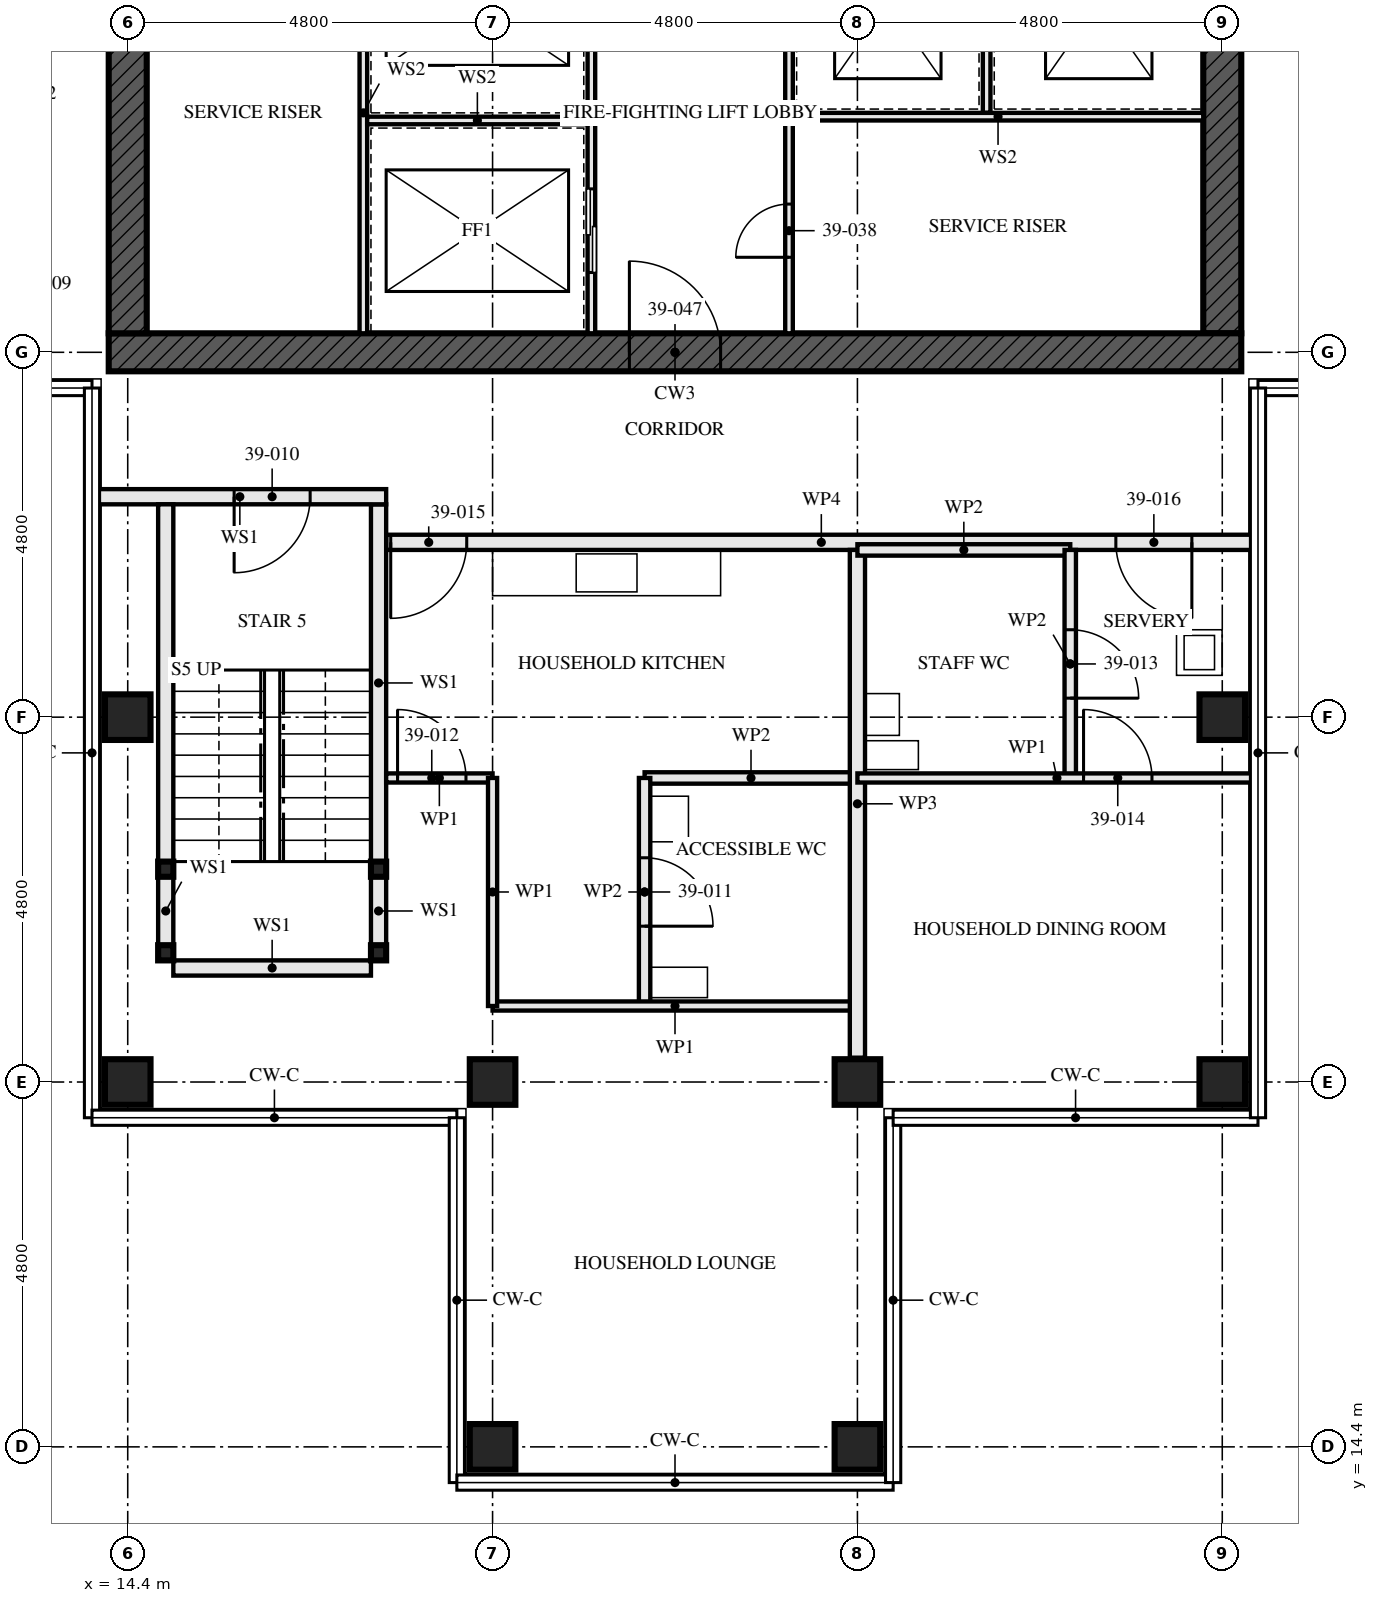
"""IFC4 building model, lengths in metres.
Left out: names, types, materials, properties, quantities, classifications, styles, units other than length and angle.
Written with IfcOpenShell. Run it as: python <this file> out.ifc"""

import sys

from ifc_helpers import new_model, si_unit, direction, frame, frame_2d, origin, origin_2d, place, context, subcontext, project, spatial, rectangle, hollow_rectangle, extrude, element, fill, save


model = new_model("IFC4")
c1 = context("Model", 3, precision=1e-05, world=origin(), true_north=direction((0.0, 1.0)))
c2 = subcontext(c1, "Body", "Model", "MODEL_VIEW")
j1 = project(units=[si_unit("LENGTHUNIT", "METRE"), si_unit("PLANEANGLEUNIT", "RADIAN")], contexts=[c1])
p1 = place(None, origin())
s1 = spatial("IfcSite", under=j1, at=p1, CompositionType="ELEMENT")
p2 = place(p1, origin())
s2 = spatial("IfcBuilding", under=s1, at=p2, CompositionType="ELEMENT")
p3 = place(p2, frame((0.0, 0.0, 144.5)))
s3 = spatial("IfcBuildingStorey", under=s2, at=p3, CompositionType="ELEMENT", Elevation=144.5)
for number, where, z_axis, x_axis in (
    (1, (14.4, 19.2, 0.0), (0.0, 0.0, 1.0), (0.0, 1.0, 0.0)),
    (2, (14.4, 24.0, 0.0), (0.0, 0.0, 1.0), (1.0, 0.0, 0.0)),
    (3, (19.2, 14.4, 0.0), (0.0, 0.0, 1.0), (0.0, 1.0, 0.0)),
    (4, (19.2, 19.2, 0.0), (0.0, 0.0, 1.0), (0.0, 1.0, 0.0)),
    (5, (24.0, 14.4, 0.0), (0.0, 0.0, 1.0), (0.0, 1.0, 0.0)),
    (6, (24.0, 19.2, 0.0), (0.0, 0.0, 1.0), (0.0, 1.0, 0.0)),
    (7, (28.8, 19.2, 0.0), (0.0, 0.0, 1.0), (0.0, 1.0, 0.0)),
    (8, (28.8, 24.0, 0.0), (0.0, 0.0, 1.0), (1.0, 0.0, 0.0)),
):
    element("IfcColumn", number, at=place(p3, frame(where, z_axis=z_axis, x_axis=x_axis)), inside=s3, PredefinedType="COLUMN", context=c2, shape_type="SweptSolid", body=[
        extrude(hollow_rectangle(XDim=0.6, YDim=0.6, WallThickness=0.08, at=origin_2d()), origin(), (0.0, 0.0, 1.0), 3.5),
    ])
p4 = place(p3, frame((14.15, 28.8, -0.17), z_axis=(0.0, 0.0, 1.0), x_axis=(1.0, 0.0, 0.0)))
e9 = element("IfcWall", 9, at=p4, inside=s3, PredefinedType="SHEAR", context=c2, shape_type="SweptSolid", body=[
    extrude(rectangle(XDim=14.9, YDim=0.5, at=frame_2d((7.45, 0.0))), origin(), (0.0, 0.0, 1.0), 3.5),
])
p5 = place(p4, frame((6.85, 0.0, 0.17)))
e10 = element("IfcOpeningElement", 10, at=p5, cuts=e9, PredefinedType="OPENING", context=c2, shape_type="SweptSolid", body=[
    extrude(rectangle(XDim=1.2, YDim=2.1, at=frame_2d((0.6, 1.05))), frame((0.0, 0.26, 0.0), z_axis=(0.0, -1.0, 0.0), x_axis=(1.0, 0.0, 0.0)), (0.0, 0.0, 1.0), 0.521),
])
p6 = place(p3, frame((14.4, 42.95, -0.17), z_axis=(0.0, 0.0, 1.0), x_axis=(0.0, -1.0, 0.0)))
e11 = element("IfcWall", 11, at=p6, inside=s3, PredefinedType="SHEAR", context=c2, shape_type="SweptSolid", body=[
    extrude(rectangle(XDim=13.9, YDim=0.5, at=frame_2d((6.95, 0.0))), origin(), (0.0, 0.0, 1.0), 3.5),
])
p7 = place(p6, frame((6.35, 0.0, 0.17)))
e12 = element("IfcOpeningElement", 12, at=p7, cuts=e11, PredefinedType="OPENING", context=c2, shape_type="SweptSolid", body=[
    extrude(rectangle(XDim=1.2, YDim=2.1, at=frame_2d((0.6, 1.05))), frame((0.0, 0.26, 0.0), z_axis=(0.0, -1.0, 0.0), x_axis=(1.0, 0.0, 0.0)), (0.0, 0.0, 1.0), 0.521),
])
p8 = place(p3, frame((28.8, 29.05, -0.17), z_axis=(0.0, 0.0, 1.0), x_axis=(0.0, 1.0, 0.0)))
e13 = element("IfcWall", 13, at=p8, inside=s3, PredefinedType="SHEAR", context=c2, shape_type="SweptSolid", body=[
    extrude(rectangle(XDim=13.9, YDim=0.5, at=frame_2d((6.95, 0.0))), origin(), (0.0, 0.0, 1.0), 3.5),
])
p9 = place(p8, frame((6.35, 0.0, 0.17)))
e14 = element("IfcOpeningElement", 14, at=p9, cuts=e13, PredefinedType="OPENING", context=c2, shape_type="SweptSolid", body=[
    extrude(rectangle(XDim=1.2, YDim=2.1, at=frame_2d((0.6, 1.05))), frame((0.0, 0.26, 0.0), z_axis=(0.0, -1.0, 0.0), x_axis=(1.0, 0.0, 0.0)), (0.0, 0.0, 1.0), 0.521),
])
for number, where, z_axis, x_axis in (
    (15, (14.9, 20.9, 0.0), (0.0, 0.0, 1.0), (1.0, 0.0, 0.0)),
    (16, (17.7, 20.9, 0.0), (0.0, 0.0, 1.0), (1.0, 0.0, 0.0)),
    (17, (14.9, 22.0, 0.0), (0.0, 0.0, 1.0), (1.0, 0.0, 0.0)),
    (18, (17.7, 22.0, 0.0), (0.0, 0.0, 1.0), (1.0, 0.0, 0.0)),
):
    element("IfcColumn", number, at=place(p3, frame(where, z_axis=z_axis, x_axis=x_axis)), inside=s3, PredefinedType="COLUMN", context=c2, shape_type="SweptSolid", body=[
        extrude(hollow_rectangle(XDim=0.2, YDim=0.2, WallThickness=0.008, at=origin_2d()), origin(), (0.0, 0.0, 1.0), 3.33),
    ])
p10 = place(p3, frame((14.9, 21.0, 0.0), z_axis=(0.0, 0.0, 1.0), x_axis=(0.0, 1.0, 0.0)))
e19 = element("IfcWall", 19, at=p10, inside=s3, PredefinedType="SOLIDWALL", context=c2, shape_type="SweptSolid", body=[
    extrude(rectangle(XDim=0.9, YDim=0.2, at=frame_2d((0.45, 0.0))), origin(), (0.0, 0.0, 1.0), 2.99),
])
p11 = place(p3, frame((14.9, 22.1, 0.0), z_axis=(0.0, 0.0, 1.0), x_axis=(0.0, 1.0, 0.0)))
e20 = element("IfcWall", 20, at=p11, inside=s3, PredefinedType="SOLIDWALL", context=c2, shape_type="SweptSolid", body=[
    extrude(rectangle(XDim=4.7, YDim=0.2, at=frame_2d((2.35, 0.0))), origin(), (0.0, 0.0, 1.0), 2.99),
])
p12 = place(p3, frame((17.7, 21.0, 0.0), z_axis=(0.0, 0.0, 1.0), x_axis=(0.0, 1.0, 0.0)))
e21 = element("IfcWall", 21, at=p12, inside=s3, PredefinedType="SOLIDWALL", context=c2, shape_type="SweptSolid", body=[
    extrude(rectangle(XDim=0.9, YDim=0.2, at=frame_2d((0.45, 0.0))), origin(), (0.0, 0.0, 1.0), 2.99),
])
p13 = place(p3, frame((17.7, 22.1, 0.0), z_axis=(0.0, 0.0, 1.0), x_axis=(0.0, 1.0, 0.0)))
e22 = element("IfcWall", 22, at=p13, inside=s3, PredefinedType="SOLIDWALL", context=c2, shape_type="SweptSolid", body=[
    extrude(rectangle(XDim=4.7, YDim=0.2, at=frame_2d((2.35, 0.0))), origin(), (0.0, 0.0, 1.0), 2.99),
])
p14 = place(p3, frame((15.0, 20.7, 0.0), z_axis=(0.0, 0.0, 1.0), x_axis=(1.0, 0.0, 0.0)))
e23 = element("IfcWall", 23, at=p14, inside=s3, PredefinedType="SOLIDWALL", context=c2, shape_type="SweptSolid", body=[
    extrude(rectangle(XDim=2.6, YDim=0.2, at=frame_2d((1.3, 0.0))), origin(), (0.0, 0.0, 1.0), 3.33),
])
p15 = place(p3, frame((13.95, 26.9, 0.0), z_axis=(0.0, 0.0, 1.0), x_axis=(1.0, 0.0, 0.0)))
e24 = element("IfcWall", 24, at=p15, inside=s3, PredefinedType="SOLIDWALL", context=c2, shape_type="SweptSolid", body=[
    extrude(rectangle(XDim=3.85, YDim=0.2, at=frame_2d((1.925, 0.0))), origin(), (0.0, 0.0, 1.0), 2.32),
])
p16 = place(p15, frame((1.85, 0.0, 0.0)))
e25 = element("IfcOpeningElement", 25, at=p16, cuts=e24, PredefinedType="OPENING", context=c2, shape_type="SweptSolid", body=[
    extrude(rectangle(XDim=1.0, YDim=2.1, at=frame_2d((0.5, 1.05))), frame((0.0, 0.111, 0.0), z_axis=(0.0, -1.0, 0.0), x_axis=(1.0, 0.0, 0.0)), (0.0, 0.0, 1.0), 0.221),
])
p17 = place(p3, frame((21.2, 20.2, 0.0), z_axis=(0.0, 0.0, 1.0), x_axis=(0.0, 1.0, 0.0)))
e26 = element("IfcWall", 26, at=p17, inside=s3, PredefinedType="PARTITIONING", context=c2, shape_type="SweptSolid", body=[
    extrude(rectangle(XDim=3.0, YDim=0.15, at=frame_2d((1.5, 0.0))), origin(), (0.0, 0.0, 1.0), 3.33),
])
p18 = place(p17, frame((1.05, 0.0, 0.0)))
e27 = element("IfcOpeningElement", 27, at=p18, cuts=e26, PredefinedType="OPENING", context=c2, shape_type="SweptSolid", body=[
    extrude(rectangle(XDim=0.9, YDim=2.1, at=frame_2d((0.45, 1.05))), frame((0.0, 0.085, 0.0), z_axis=(0.0, -1.0, 0.0), x_axis=(1.0, 0.0, 0.0)), (0.0, 0.0, 1.0), 0.171),
])
p19 = place(p3, frame((21.2, 23.2, 0.0), z_axis=(0.0, 0.0, 1.0), x_axis=(1.0, 0.0, 0.0)))
e28 = element("IfcWall", 28, at=p19, inside=s3, PredefinedType="PARTITIONING", context=c2, shape_type="SweptSolid", body=[
    extrude(rectangle(XDim=2.8, YDim=0.15, at=frame_2d((1.4, 0.0))), origin(), (0.0, 0.0, 1.0), 3.33),
])
p20 = place(p3, frame((17.8, 23.2, 0.0), z_axis=(0.0, 0.0, 1.0), x_axis=(1.0, 0.0, 0.0)))
e29 = element("IfcWall", 29, at=p20, inside=s3, PredefinedType="PARTITIONING", context=c2, shape_type="SweptSolid", body=[
    extrude(rectangle(XDim=1.4, YDim=0.12, at=frame_2d((0.7, 0.0))), origin(), (0.0, 0.0, 1.0), 3.33),
])
p21 = place(p20, frame((0.15, 0.0, 0.0)))
e30 = element("IfcOpeningElement", 30, at=p21, cuts=e29, PredefinedType="OPENING", context=c2, shape_type="SweptSolid", body=[
    extrude(rectangle(XDim=0.9, YDim=2.1, at=frame_2d((0.45, 1.05))), frame((0.0, 0.071, 0.0), z_axis=(0.0, -1.0, 0.0), x_axis=(1.0, 0.0, 0.0)), (0.0, 0.0, 1.0), 0.141),
])
p22 = place(p3, frame((19.2, 20.2, 0.0), z_axis=(0.0, 0.0, 1.0), x_axis=(1.0, 0.0, 0.0)))
e31 = element("IfcWall", 31, at=p22, inside=s3, PredefinedType="PARTITIONING", context=c2, shape_type="SweptSolid", body=[
    extrude(rectangle(XDim=4.8, YDim=0.12, at=frame_2d((2.4, 0.0))), origin(), (0.0, 0.0, 1.0), 3.33),
])
p23 = place(p3, frame((19.2, 20.2, 0.0), z_axis=(0.0, 0.0, 1.0), x_axis=(0.0, 1.0, 0.0)))
e32 = element("IfcWall", 32, at=p23, inside=s3, PredefinedType="PARTITIONING", context=c2, shape_type="SweptSolid", body=[
    extrude(rectangle(XDim=3.0, YDim=0.12, at=frame_2d((1.5, 0.0))), origin(), (0.0, 0.0, 1.0), 2.55),
])
p24 = place(p3, frame((24.0, 19.52, 0.0), z_axis=(0.0, 0.0, 1.0), x_axis=(0.0, 1.0, 0.0)))
e33 = element("IfcWall", 33, at=p24, inside=s3, PredefinedType="PARTITIONING", context=c2, shape_type="SweptSolid", body=[
    extrude(rectangle(XDim=6.68, YDim=0.2, at=frame_2d((3.34, 0.0))), origin(), (0.0, 0.0, 1.0), 2.55),
])
p25 = place(p3, frame((26.8, 23.2, 0.0), z_axis=(0.0, 0.0, 1.0), x_axis=(0.0, 1.0, 0.0)))
e34 = element("IfcWall", 34, at=p25, inside=s3, PredefinedType="PARTITIONING", context=c2, shape_type="SweptSolid", body=[
    extrude(rectangle(XDim=3.0, YDim=0.15, at=frame_2d((1.5, 0.0))), origin(), (0.0, 0.0, 1.0), 2.55),
])
p26 = place(p25, frame((1.05, 0.0, 0.0)))
e35 = element("IfcOpeningElement", 35, at=p26, cuts=e34, PredefinedType="OPENING", context=c2, shape_type="SweptSolid", body=[
    extrude(rectangle(XDim=0.9, YDim=2.1, at=frame_2d((0.45, 1.05))), frame((0.0, 0.085, 0.0), z_axis=(0.0, -1.0, 0.0), x_axis=(1.0, 0.0, 0.0)), (0.0, 0.0, 1.0), 0.171),
])
p27 = place(p3, frame((24.0, 26.2, 0.0), z_axis=(0.0, 0.0, 1.0), x_axis=(1.0, 0.0, 0.0)))
e36 = element("IfcWall", 36, at=p27, inside=s3, PredefinedType="PARTITIONING", context=c2, shape_type="SweptSolid", body=[
    extrude(rectangle(XDim=2.8, YDim=0.15, at=frame_2d((1.4, 0.0))), origin(), (0.0, 0.0, 1.0), 3.33),
])
p28 = place(p3, frame((24.0, 23.2, 0.0), z_axis=(0.0, 0.0, 1.0), x_axis=(1.0, 0.0, 0.0)))
e37 = element("IfcWall", 37, at=p28, inside=s3, PredefinedType="PARTITIONING", context=c2, shape_type="SweptSolid", body=[
    extrude(rectangle(XDim=5.25, YDim=0.12, at=frame_2d((2.625, 0.0))), origin(), (0.0, 0.0, 1.0), 2.32),
])
p29 = place(p28, frame((2.975, 0.0, 0.0)))
e38 = element("IfcOpeningElement", 38, at=p29, cuts=e37, PredefinedType="OPENING", context=c2, shape_type="SweptSolid", body=[
    extrude(rectangle(XDim=0.9, YDim=2.1, at=frame_2d((0.45, 1.05))), frame((0.0, 0.071, 0.0), z_axis=(0.0, -1.0, 0.0), x_axis=(1.0, 0.0, 0.0)), (0.0, 0.0, 1.0), 0.141),
])
p30 = place(p3, frame((17.8, 26.3, 0.0), z_axis=(0.0, 0.0, 1.0), x_axis=(1.0, 0.0, 0.0)))
e39 = element("IfcWall", 39, at=p30, inside=s3, PredefinedType="PARTITIONING", context=c2, shape_type="SweptSolid", body=[
    extrude(rectangle(XDim=11.45, YDim=0.2, at=frame_2d((5.725, 0.0))), origin(), (0.0, 0.0, 1.0), 2.32),
])
p31 = place(p30, frame((0.06, 0.0, 0.0)))
e40 = element("IfcOpeningElement", 40, at=p31, cuts=e39, PredefinedType="OPENING", context=c2, shape_type="SweptSolid", body=[
    extrude(rectangle(XDim=1.0, YDim=2.1, at=frame_2d((0.5, 1.05))), frame((0.0, 0.111, 0.0), z_axis=(0.0, -1.0, 0.0), x_axis=(1.0, 0.0, 0.0)), (0.0, 0.0, 1.0), 0.221),
])
p32 = place(p30, frame((9.6, 0.0, 0.0)))
e41 = element("IfcOpeningElement", 41, at=p32, cuts=e39, PredefinedType="OPENING", context=c2, shape_type="SweptSolid", body=[
    extrude(rectangle(XDim=1.0, YDim=2.1, at=frame_2d((0.5, 1.05))), frame((0.0, 0.111, 0.0), z_axis=(0.0, -1.0, 0.0), x_axis=(1.0, 0.0, 0.0)), (0.0, 0.0, 1.0), 0.221),
])
p33 = place(p3, frame((20.5, 29.05, 0.0), z_axis=(0.0, 0.0, 1.0), x_axis=(0.0, 1.0, 0.0)))
e42 = element("IfcWall", 42, at=p33, inside=s3, PredefinedType="SOLIDWALL", context=c2, shape_type="SweptSolid", body=[
    extrude(rectangle(XDim=5.8, YDim=0.1, at=frame_2d((2.9, 0.0))), origin(), (0.0, 0.0, 1.0), 3.33),
])
p34 = place(p33, frame((0.8, 0.0, 0.0)))
e43 = element("IfcOpeningElement", 43, at=p34, cuts=e42, PredefinedType="OPENING", context=c2, shape_type="SweptSolid", body=[
    extrude(rectangle(XDim=1.1, YDim=2.3, at=frame_2d((0.55, 1.15))), frame((0.0, 0.061, 0.0), z_axis=(0.0, -1.0, 0.0), x_axis=(1.0, 0.0, 0.0)), (0.0, 0.0, 1.0), 0.121),
])
p35 = place(p33, frame((3.775, 0.0, 0.0)))
e44 = element("IfcOpeningElement", 44, at=p35, cuts=e42, PredefinedType="OPENING", context=c2, shape_type="SweptSolid", body=[
    extrude(rectangle(XDim=1.1, YDim=2.3, at=frame_2d((0.55, 1.15))), frame((0.0, 0.061, 0.0), z_axis=(0.0, -1.0, 0.0), x_axis=(1.0, 0.0, 0.0)), (0.0, 0.0, 1.0), 0.121),
])
p36 = place(p3, frame((23.1, 29.05, 0.0), z_axis=(0.0, 0.0, 1.0), x_axis=(0.0, 1.0, 0.0)))
e45 = element("IfcWall", 45, at=p36, inside=s3, PredefinedType="SOLIDWALL", context=c2, shape_type="SweptSolid", body=[
    extrude(rectangle(XDim=5.8, YDim=0.1, at=frame_2d((2.9, 0.0))), origin(), (0.0, 0.0, 1.0), 3.33),
])
p37 = place(p36, frame((1.0, 0.0, 0.0)))
e46 = element("IfcOpeningElement", 46, at=p37, cuts=e45, PredefinedType="OPENING", context=c2, shape_type="SweptSolid", body=[
    extrude(rectangle(XDim=0.7, YDim=2.1, at=frame_2d((0.35, 1.05))), frame((0.0, 0.061, 0.0), z_axis=(0.0, -1.0, 0.0), x_axis=(1.0, 0.0, 0.0)), (0.0, 0.0, 1.0), 0.121),
])
p38 = place(p3, frame((17.5, 29.05, 0.0), z_axis=(0.0, 0.0, 1.0), x_axis=(0.0, 1.0, 0.0)))
e47 = element("IfcWall", 47, at=p38, inside=s3, PredefinedType="SOLIDWALL", context=c2, shape_type="SweptSolid", body=[
    extrude(rectangle(XDim=5.8, YDim=0.1, at=frame_2d((2.9, 0.0))), origin(), (0.0, 0.0, 1.0), 3.33),
])
p39 = place(p3, frame((17.55, 31.85, 0.0), z_axis=(0.0, 0.0, 1.0), x_axis=(1.0, 0.0, 0.0)))
e48 = element("IfcWall", 48, at=p39, inside=s3, PredefinedType="SOLIDWALL", context=c2, shape_type="SweptSolid", body=[
    extrude(rectangle(XDim=2.9, YDim=0.1, at=frame_2d((1.45, 0.0))), origin(), (0.0, 0.0, 1.0), 3.33),
])
p40 = place(p3, frame((25.7, 31.95, 0.0), z_axis=(0.0, 0.0, 1.0), x_axis=(0.0, 1.0, 0.0)))
e49 = element("IfcWall", 49, at=p40, inside=s3, PredefinedType="SOLIDWALL", context=c2, shape_type="SweptSolid", body=[
    extrude(rectangle(XDim=2.9, YDim=0.1, at=frame_2d((1.45, 0.0))), origin(), (0.0, 0.0, 1.0), 3.33),
])
p41 = place(p3, frame((23.15, 31.9, 0.0), z_axis=(0.0, 0.0, 1.0), x_axis=(1.0, 0.0, 0.0)))
e50 = element("IfcWall", 50, at=p41, inside=s3, PredefinedType="SOLIDWALL", context=c2, shape_type="SweptSolid", body=[
    extrude(rectangle(XDim=5.4, YDim=0.1, at=frame_2d((2.7, 0.0))), origin(), (0.0, 0.0, 1.0), 3.33),
])
p42 = place(p16, frame((1.0, 0.0, 0.0), z_axis=(0.0, 0.0, 1.0), x_axis=(-1.0, 0.0, 0.0)))
e51 = element("IfcDoor", 51, at=p42, inside=s3, OperationType="SINGLE_SWING_LEFT", PredefinedType="DOOR", context=c2, shape_type="SweptSolid", body=[
    extrude(rectangle(XDim=1.0, YDim=2.1, at=frame_2d((0.5, 1.05))), frame((0.0, 0.032, 0.0), z_axis=(0.0, -1.0, 0.0), x_axis=(1.0, 0.0, 0.0)), (0.0, 0.0, 1.0), 0.064),
])
fill(e25, e51)
p43 = place(p18, frame((0.9, 0.0, 0.0), z_axis=(0.0, 0.0, 1.0), x_axis=(-1.0, 0.0, 0.0)))
e52 = element("IfcDoor", 52, at=p43, inside=s3, OperationType="SINGLE_SWING_LEFT", PredefinedType="DOOR", context=c2, shape_type="SweptSolid", body=[
    extrude(rectangle(XDim=0.9, YDim=2.1, at=frame_2d((0.45, 1.05))), frame((0.0, 0.022, 0.0), z_axis=(0.0, -1.0, 0.0), x_axis=(1.0, 0.0, 0.0)), (0.0, 0.0, 1.0), 0.044),
])
fill(e27, e52)
p44 = place(p21, origin())
e53 = element("IfcDoor", 53, at=p44, inside=s3, OperationType="SINGLE_SWING_RIGHT", PredefinedType="DOOR", context=c2, shape_type="SweptSolid", body=[
    extrude(rectangle(XDim=0.9, YDim=2.1, at=frame_2d((0.45, 1.05))), frame((0.0, 0.022, 0.0), z_axis=(0.0, -1.0, 0.0), x_axis=(1.0, 0.0, 0.0)), (0.0, 0.0, 1.0), 0.044),
])
fill(e30, e53)
p45 = place(p26, frame((0.9, 0.0, 0.0), z_axis=(0.0, 0.0, 1.0), x_axis=(-1.0, 0.0, 0.0)))
e54 = element("IfcDoor", 54, at=p45, inside=s3, OperationType="SINGLE_SWING_LEFT", PredefinedType="DOOR", context=c2, shape_type="SweptSolid", body=[
    extrude(rectangle(XDim=0.9, YDim=2.1, at=frame_2d((0.45, 1.05))), frame((0.0, 0.022, 0.0), z_axis=(0.0, -1.0, 0.0), x_axis=(1.0, 0.0, 0.0)), (0.0, 0.0, 1.0), 0.044),
])
fill(e35, e54)
p46 = place(p29, origin())
e55 = element("IfcDoor", 55, at=p46, inside=s3, OperationType="SINGLE_SWING_RIGHT", PredefinedType="DOOR", context=c2, shape_type="SweptSolid", body=[
    extrude(rectangle(XDim=0.9, YDim=2.1, at=frame_2d((0.45, 1.05))), frame((0.0, 0.022, 0.0), z_axis=(0.0, -1.0, 0.0), x_axis=(1.0, 0.0, 0.0)), (0.0, 0.0, 1.0), 0.044),
])
fill(e38, e55)
p47 = place(p31, frame((1.0, 0.0, 0.0), z_axis=(0.0, 0.0, 1.0), x_axis=(-1.0, 0.0, 0.0)))
e56 = element("IfcDoor", 56, at=p47, inside=s3, OperationType="SINGLE_SWING_LEFT", PredefinedType="DOOR", context=c2, shape_type="SweptSolid", body=[
    extrude(rectangle(XDim=1.0, YDim=2.1, at=frame_2d((0.5, 1.05))), frame((0.0, 0.027, 0.0), z_axis=(0.0, -1.0, 0.0), x_axis=(1.0, 0.0, 0.0)), (0.0, 0.0, 1.0), 0.054),
])
fill(e40, e56)
p48 = place(p32, frame((1.0, 0.0, 0.0), z_axis=(0.0, 0.0, 1.0), x_axis=(-1.0, 0.0, 0.0)))
e57 = element("IfcDoor", 57, at=p48, inside=s3, OperationType="SINGLE_SWING_RIGHT", PredefinedType="DOOR", context=c2, shape_type="SweptSolid", body=[
    extrude(rectangle(XDim=1.0, YDim=2.1, at=frame_2d((0.5, 1.05))), frame((0.0, 0.027, 0.0), z_axis=(0.0, -1.0, 0.0), x_axis=(1.0, 0.0, 0.0)), (0.0, 0.0, 1.0), 0.054),
])
fill(e41, e57)
p49 = place(p34, origin())
e58 = element("IfcDoor", 58, at=p49, inside=s3, OperationType="SLIDING_TO_LEFT", PredefinedType="DOOR", context=c2, shape_type="SweptSolid", body=[
    extrude(rectangle(XDim=1.1, YDim=2.3, at=frame_2d((0.55, 1.15))), frame((0.0, 0.05, 0.0), z_axis=(0.0, -1.0, 0.0), x_axis=(1.0, 0.0, 0.0)), (0.0, 0.0, 1.0), 0.1),
])
fill(e43, e58)
p50 = place(p37, origin())
e59 = element("IfcDoor", 59, at=p50, inside=s3, OperationType="SINGLE_SWING_RIGHT", PredefinedType="DOOR", context=c2, shape_type="SweptSolid", body=[
    extrude(rectangle(XDim=0.7, YDim=2.1, at=frame_2d((0.35, 1.05))), frame((0.0, 0.027, 0.0), z_axis=(0.0, -1.0, 0.0), x_axis=(1.0, 0.0, 0.0)), (0.0, 0.0, 1.0), 0.054),
])
fill(e46, e59)
p51 = place(p5, origin())
e60 = element("IfcDoor", 60, at=p51, inside=s3, OperationType="SINGLE_SWING_LEFT", PredefinedType="DOOR", context=c2, shape_type="SweptSolid", body=[
    extrude(rectangle(XDim=1.2, YDim=2.1, at=frame_2d((0.6, 1.05))), frame((0.0, 0.027, 0.0), z_axis=(0.0, -1.0, 0.0), x_axis=(1.0, 0.0, 0.0)), (0.0, 0.0, 1.0), 0.054),
])
fill(e10, e60)
save(model, sys.argv[1])
